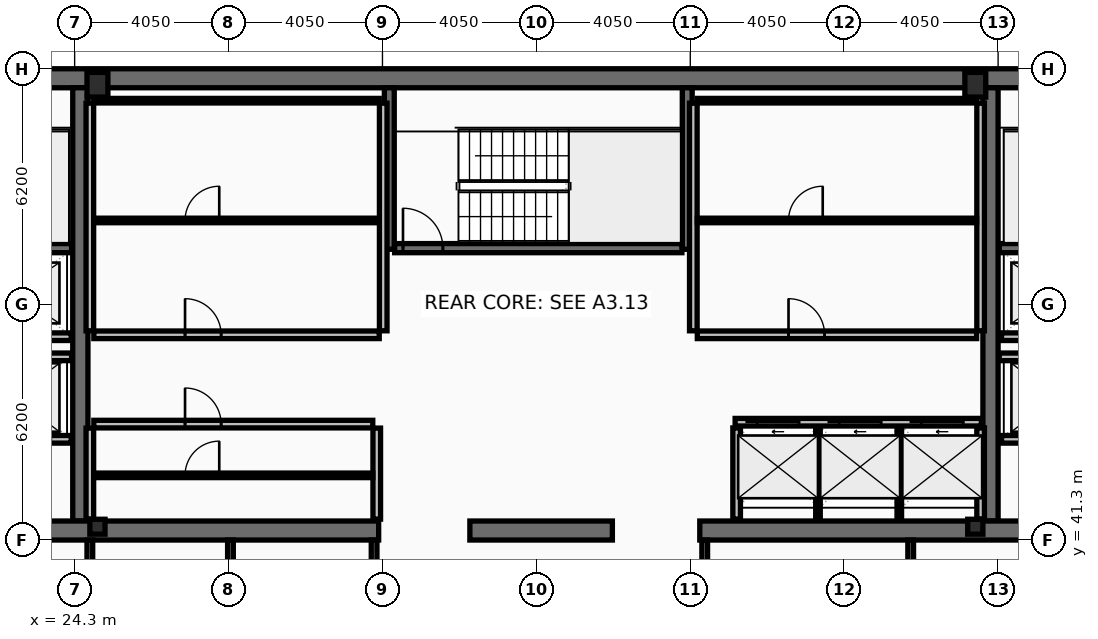
"""IFC4 building model, lengths in metres.
Left out: names, types, materials, properties, quantities, classifications, styles, units other than length and angle.
Written with IfcOpenShell. Run it as: python <this file> out.ifc"""

import sys

from ifc_helpers import new_model, si_unit, direction, frame, frame_2d, origin, origin_2d, place, context, subcontext, project, spatial, rectangle, hollow_rectangle, i_section, extrude, element, fill, save


model = new_model("IFC4")
c1 = context("Model", 3, precision=1e-05, world=origin(), true_north=direction((0.0, 1.0)))
c2 = subcontext(c1, "Body", "Model", "MODEL_VIEW")
j1 = project(units=[si_unit("LENGTHUNIT", "METRE"), si_unit("PLANEANGLEUNIT", "RADIAN")], contexts=[c1])
p1 = place(None, origin())
s1 = spatial("IfcSite", under=j1, at=p1, CompositionType="ELEMENT")
p2 = place(p1, origin())
s2 = spatial("IfcBuilding", under=s1, at=p2, CompositionType="ELEMENT")
p3 = place(p2, frame((0.0, 0.0, 318.2)))
s3 = spatial("IfcBuildingStorey", under=s2, at=p3, CompositionType="ELEMENT", Elevation=318.2)
p4 = place(p3, frame((16.2, 53.45, 0.0), z_axis=(0.0, 0.0, 1.0), x_axis=(1.0, 0.0, 0.0)))
e1 = element("IfcWall", 1, at=p4, inside=s3, PredefinedType="SHEAR", context=c2, shape_type="SweptSolid", body=[
    extrude(rectangle(XDim=40.5, YDim=0.5, at=frame_2d((20.25, 0.0))), origin(), (0.0, 0.0, 1.0), 3.44),
])
for number, where, z_axis, x_axis in (
    (2, (24.45, 41.8, 0.0), (0.0, 0.0, 1.0), (0.0, 1.0, 0.0)),
    (3, (48.4, 41.8, 0.0), (0.0, 0.0, 1.0), (0.0, 1.0, 0.0)),
):
    element("IfcWall", number, at=place(p3, frame(where, z_axis=z_axis, x_axis=x_axis)), inside=s3, PredefinedType="SHEAR", context=c2, shape_type="SweptSolid", body=[
        extrude(rectangle(XDim=11.4, YDim=0.4, at=frame_2d((5.7, 0.0))), origin(), (0.0, 0.0, 1.0), 3.44),
    ])
p5 = place(p3, frame((32.3, 41.55, 0.0), z_axis=(0.0, 0.0, 1.0), x_axis=(-1.0, 0.0, 0.0)))
e4 = element("IfcWall", 4, at=p5, inside=s3, PredefinedType="SHEAR", context=c2, shape_type="SweptSolid", body=[
    extrude(rectangle(XDim=11.45, YDim=0.5, at=frame_2d((5.725, 0.0))), origin(), (0.0, 0.0, 1.0), 3.44),
])
p6 = place(p3, frame((38.45, 41.55, 0.0), z_axis=(0.0, 0.0, 1.0), x_axis=(-1.0, 0.0, 0.0)))
e5 = element("IfcWall", 5, at=p6, inside=s3, PredefinedType="SHEAR", context=c2, shape_type="SweptSolid", body=[
    extrude(rectangle(XDim=3.75, YDim=0.5, at=frame_2d((1.875, 0.0))), origin(), (0.0, 0.0, 1.0), 3.44),
])
p7 = place(p3, frame((52.05, 41.55, 0.0), z_axis=(0.0, 0.0, 1.0), x_axis=(-1.0, 0.0, 0.0)))
e6 = element("IfcWall", 6, at=p7, inside=s3, PredefinedType="SHEAR", context=c2, shape_type="SweptSolid", body=[
    extrude(rectangle(XDim=11.3, YDim=0.5, at=frame_2d((5.65, 0.0))), origin(), (0.0, 0.0, 1.0), 3.44),
])
for number, where, z_axis, x_axis in (
    (7, (32.58, 48.95, 0.0), (0.0, 0.0, 1.0), (0.0, 1.0, 0.0)),
    (8, (40.42, 48.95, 0.0), (0.0, 0.0, 1.0), (0.0, 1.0, 0.0)),
):
    element("IfcWall", number, at=place(p3, frame(where, z_axis=z_axis, x_axis=x_axis)), inside=s3, PredefinedType="SHEAR", context=c2, shape_type="SweptSolid", body=[
        extrude(rectangle(XDim=4.25, YDim=0.26, at=frame_2d((2.125, 0.0))), origin(), (0.0, 0.0, 1.0), 3.44),
    ])
p8 = place(p3, frame((16.7, 48.98, 0.0), z_axis=(0.0, 0.0, 1.0), x_axis=(1.0, 0.0, 0.0)))
e9 = element("IfcWall", 9, at=p8, inside=s3, PredefinedType="SHEAR", context=c2, shape_type="SweptSolid", body=[
    extrude(rectangle(XDim=7.52, YDim=0.24, at=frame_2d((3.76, 0.0))), origin(), (0.0, 0.0, 1.0), 3.44),
])
p9 = place(p8, frame((0.22, 0.0, 0.0)))
e10 = element("IfcOpeningElement", 10, at=p9, cuts=e9, PredefinedType="OPENING", context=c2, shape_type="SweptSolid", body=[
    extrude(rectangle(XDim=1.05, YDim=2.15, at=frame_2d((0.525, 1.075))), frame((0.0, 0.13, 0.0), z_axis=(0.0, -1.0, 0.0), x_axis=(1.0, 0.0, 0.0)), (0.0, 0.0, 1.0), 0.26),
])
p10 = place(p3, frame((48.63, 48.98, 0.0), z_axis=(0.0, 0.0, 1.0), x_axis=(1.0, 0.0, 0.0)))
e11 = element("IfcWall", 11, at=p10, inside=s3, PredefinedType="SHEAR", context=c2, shape_type="SweptSolid", body=[
    extrude(rectangle(XDim=7.57, YDim=0.24, at=frame_2d((3.785, 0.0))), origin(), (0.0, 0.0, 1.0), 3.44),
])
p11 = place(p10, frame((6.3, 0.0, 0.0)))
e12 = element("IfcOpeningElement", 12, at=p11, cuts=e11, PredefinedType="OPENING", context=c2, shape_type="SweptSolid", body=[
    extrude(rectangle(XDim=1.05, YDim=2.15, at=frame_2d((0.525, 1.075))), frame((0.0, 0.13, 0.0), z_axis=(0.0, -1.0, 0.0), x_axis=(1.0, 0.0, 0.0)), (0.0, 0.0, 1.0), 0.26),
])
p12 = place(p3, frame((32.72, 48.98, 0.0), z_axis=(0.0, 0.0, 1.0), x_axis=(1.0, 0.0, 0.0)))
e13 = element("IfcWall", 13, at=p12, inside=s3, PredefinedType="SHEAR", context=c2, shape_type="SweptSolid", body=[
    extrude(rectangle(XDim=7.56, YDim=0.24, at=frame_2d((3.78, 0.0))), origin(), (0.0, 0.0, 1.0), 3.44),
])
p13 = place(p12, frame((0.22, 0.0, 0.0)))
e14 = element("IfcOpeningElement", 14, at=p13, cuts=e13, PredefinedType="OPENING", context=c2, shape_type="SweptSolid", body=[
    extrude(rectangle(XDim=1.05, YDim=2.15, at=frame_2d((0.525, 1.075))), frame((0.0, 0.13, 0.0), z_axis=(0.0, -1.0, 0.0), x_axis=(1.0, 0.0, 0.0)), (0.0, 0.0, 1.0), 0.26),
])
for number, where, z_axis, x_axis in (
    (15, (24.9, 53.28, 0.0), (0.0, 0.0, 1.0), (1.0, 0.0, 0.0)),
    (16, (48.0, 53.28, 0.0), (0.0, 0.0, 1.0), (1.0, 0.0, 0.0)),
):
    element("IfcColumn", number, at=place(p3, frame(where, z_axis=z_axis, x_axis=x_axis)), inside=s3, PredefinedType="COLUMN", context=c2, shape_type="SweptSolid", body=[
        extrude(hollow_rectangle(XDim=0.55, YDim=0.65, WallThickness=0.04, at=origin_2d()), origin(), (0.0, 0.0, 1.0), 3.6),
    ])
for number, where, z_axis, x_axis in (
    (17, (24.9, 41.65, 0.0), (0.0, 0.0, 1.0), (1.0, 0.0, 0.0)),
    (18, (48.0, 41.65, 0.0), (0.0, 0.0, 1.0), (1.0, 0.0, 0.0)),
):
    element("IfcColumn", number, at=place(p3, frame(where, z_axis=z_axis, x_axis=x_axis)), inside=s3, PredefinedType="COLUMN", context=c2, shape_type="SweptSolid", body=[
        extrude(i_section(OverallWidth=0.399, OverallDepth=0.393, WebThickness=0.023, FlangeThickness=0.037, at=origin_2d()), origin(), (0.0, 0.0, 1.0), 3.6),
    ])
p14 = place(p3, frame((41.68, 44.4, 0.0), z_axis=(0.0, 0.0, 1.0), x_axis=(1.0, 0.0, 0.0)))
e19 = element("IfcWall", 19, at=p14, inside=s3, PredefinedType="PARTITIONING", context=c2, shape_type="SweptSolid", body=[
    extrude(rectangle(XDim=6.48, YDim=0.2, at=frame_2d((3.24, 0.0))), origin(), (0.0, 0.0, 1.0), 3.44),
])
p15 = place(p14, frame((0.58, 0.0, 0.0)))
e20 = element("IfcOpeningElement", 20, at=p15, cuts=e19, PredefinedType="OPENING", context=c2, shape_type="SweptSolid", body=[
    extrude(rectangle(XDim=1.1, YDim=2.18, at=frame_2d((0.55, 1.09))), frame((0.0, 0.11, 0.0), z_axis=(0.0, -1.0, 0.0), x_axis=(1.0, 0.0, 0.0)), (0.0, 0.0, 1.0), 0.22),
])
p16 = place(p14, frame((2.74, 0.0, 0.0)))
e21 = element("IfcOpeningElement", 21, at=p16, cuts=e19, PredefinedType="OPENING", context=c2, shape_type="SweptSolid", body=[
    extrude(rectangle(XDim=1.1, YDim=2.18, at=frame_2d((0.55, 1.09))), frame((0.0, 0.11, 0.0), z_axis=(0.0, -1.0, 0.0), x_axis=(1.0, 0.0, 0.0)), (0.0, 0.0, 1.0), 0.22),
])
p17 = place(p14, frame((4.9, 0.0, 0.0)))
e22 = element("IfcOpeningElement", 22, at=p17, cuts=e19, PredefinedType="OPENING", context=c2, shape_type="SweptSolid", body=[
    extrude(rectangle(XDim=1.1, YDim=2.18, at=frame_2d((0.55, 1.09))), frame((0.0, 0.11, 0.0), z_axis=(0.0, -1.0, 0.0), x_axis=(1.0, 0.0, 0.0)), (0.0, 0.0, 1.0), 0.22),
])
p18 = place(p3, frame((51.61, 43.95, 0.0), z_axis=(0.0, 0.0, 1.0), x_axis=(-1.0, 0.0, 0.0)))
e23 = element("IfcWall", 23, at=p18, inside=s3, PredefinedType="PARTITIONING", context=c2, shape_type="SweptSolid", body=[
    extrude(rectangle(XDim=2.92, YDim=0.2, at=frame_2d((1.46, 0.0))), origin(), (0.0, 0.0, 1.0), 3.44),
])
p19 = place(p18, frame((0.81, 0.0, 0.0)))
e24 = element("IfcOpeningElement", 24, at=p19, cuts=e23, PredefinedType="OPENING", context=c2, shape_type="SweptSolid", body=[
    extrude(rectangle(XDim=1.3, YDim=2.18, at=frame_2d((0.65, 1.09))), frame((0.0, 0.11, 0.0), z_axis=(0.0, -1.0, 0.0), x_axis=(1.0, 0.0, 0.0)), (0.0, 0.0, 1.0), 0.22),
])
p20 = place(p3, frame((24.21, 43.95, 0.0), z_axis=(0.0, 0.0, 1.0), x_axis=(-1.0, 0.0, 0.0)))
e25 = element("IfcWall", 25, at=p20, inside=s3, PredefinedType="PARTITIONING", context=c2, shape_type="SweptSolid", body=[
    extrude(rectangle(XDim=2.97, YDim=0.2, at=frame_2d((1.485, 0.0))), origin(), (0.0, 0.0, 1.0), 3.44),
])
p21 = place(p20, frame((0.86, 0.0, 0.0)))
e26 = element("IfcOpeningElement", 26, at=p21, cuts=e25, PredefinedType="OPENING", context=c2, shape_type="SweptSolid", body=[
    extrude(rectangle(XDim=1.3, YDim=2.18, at=frame_2d((0.65, 1.09))), frame((0.0, 0.11, 0.0), z_axis=(0.0, -1.0, 0.0), x_axis=(1.0, 0.0, 0.0)), (0.0, 0.0, 1.0), 0.22),
])
p22 = place(p3, frame((51.61, 46.65, 0.0), z_axis=(0.0, 0.0, 1.0), x_axis=(-1.0, 0.0, 0.0)))
e27 = element("IfcWall", 27, at=p22, inside=s3, PredefinedType="PARTITIONING", context=c2, shape_type="SweptSolid", body=[
    extrude(rectangle(XDim=2.92, YDim=0.2, at=frame_2d((1.46, 0.0))), origin(), (0.0, 0.0, 1.0), 3.44),
])
p23 = place(p22, frame((0.86, 0.0, 0.0)))
e28 = element("IfcOpeningElement", 28, at=p23, cuts=e27, PredefinedType="OPENING", context=c2, shape_type="SweptSolid", body=[
    extrude(rectangle(XDim=1.2, YDim=2.18, at=frame_2d((0.6, 1.09))), frame((0.0, 0.11, 0.0), z_axis=(0.0, -1.0, 0.0), x_axis=(1.0, 0.0, 0.0)), (0.0, 0.0, 1.0), 0.22),
])
p24 = place(p3, frame((24.21, 46.65, 0.0), z_axis=(0.0, 0.0, 1.0), x_axis=(-1.0, 0.0, 0.0)))
e29 = element("IfcWall", 29, at=p24, inside=s3, PredefinedType="PARTITIONING", context=c2, shape_type="SweptSolid", body=[
    extrude(rectangle(XDim=2.97, YDim=0.2, at=frame_2d((1.485, 0.0))), origin(), (0.0, 0.0, 1.0), 3.44),
])
p25 = place(p24, frame((0.91, 0.0, 0.0)))
e30 = element("IfcOpeningElement", 30, at=p25, cuts=e29, PredefinedType="OPENING", context=c2, shape_type="SweptSolid", body=[
    extrude(rectangle(XDim=1.2, YDim=2.18, at=frame_2d((0.6, 1.09))), frame((0.0, 0.11, 0.0), z_axis=(0.0, -1.0, 0.0), x_axis=(1.0, 0.0, 0.0)), (0.0, 0.0, 1.0), 0.22),
])
p26 = place(p3, frame((21.2, 46.12, 0.0), z_axis=(0.0, 0.0, 1.0), x_axis=(1.0, 0.0, 0.0)))
e31 = element("IfcWall", 31, at=p26, inside=s3, PredefinedType="PARTITIONING", context=c2, shape_type="SweptSolid", body=[
    extrude(rectangle(XDim=3.02, YDim=0.2, at=frame_2d((1.51, 0.0))), origin(), (0.0, 0.0, 1.0), 3.44),
])
p27 = place(p3, frame((48.63, 46.12, 0.0), z_axis=(0.0, 0.0, 1.0), x_axis=(1.0, 0.0, 0.0)))
e32 = element("IfcWall", 32, at=p27, inside=s3, PredefinedType="PARTITIONING", context=c2, shape_type="SweptSolid", body=[
    extrude(rectangle(XDim=3.07, YDim=0.2, at=frame_2d((1.535, 0.0))), origin(), (0.0, 0.0, 1.0), 3.44),
])
for number, where, z_axis, x_axis in (
    (33, (24.7, 46.805, 0.0), (0.0, 0.0, 1.0), (0.0, 1.0, 0.0)),
    (34, (32.42, 46.805, 0.0), (0.0, 0.0, 1.0), (0.0, 1.0, 0.0)),
):
    element("IfcWall", number, at=place(p3, frame(where, z_axis=z_axis, x_axis=x_axis)), inside=s3, PredefinedType="PARTITIONING", context=c2, shape_type="SweptSolid", body=[
        extrude(rectangle(XDim=5.99, YDim=0.2, at=frame_2d((2.995, 0.0))), origin(), (0.0, 0.0, 1.0), 3.44),
    ])
p28 = place(p3, frame((24.805, 52.86, 0.0), z_axis=(0.0, 0.0, 1.0), x_axis=(1.0, 0.0, 0.0)))
e35 = element("IfcWall", 35, at=p28, inside=s3, PredefinedType="PARTITIONING", context=c2, shape_type="SweptSolid", body=[
    extrude(rectangle(XDim=7.51, YDim=0.12, at=frame_2d((3.755, 0.0))), origin(), (0.0, 0.0, 1.0), 3.44),
])
p29 = place(p3, frame((24.805, 49.709, 0.0), z_axis=(0.0, 0.0, 1.0), x_axis=(1.0, 0.0, 0.0)))
e36 = element("IfcWall", 36, at=p29, inside=s3, PredefinedType="PARTITIONING", context=c2, shape_type="SweptSolid", body=[
    extrude(rectangle(XDim=7.51, YDim=0.12, at=frame_2d((3.755, 0.0))), origin(), (0.0, 0.0, 1.0), 3.44),
])
p30 = place(p29, frame((2.4, 0.0, 0.0)))
e37 = element("IfcOpeningElement", 37, at=p30, cuts=e36, PredefinedType="OPENING", context=c2, shape_type="SweptSolid", body=[
    extrude(rectangle(XDim=0.9, YDim=2.05, at=frame_2d((0.45, 1.025))), frame((0.0, 0.07, 0.0), z_axis=(0.0, -1.0, 0.0), x_axis=(1.0, 0.0, 0.0)), (0.0, 0.0, 1.0), 0.14),
])
p31 = place(p3, frame((24.805, 46.7, 0.0), z_axis=(0.0, 0.0, 1.0), x_axis=(1.0, 0.0, 0.0)))
e38 = element("IfcWall", 38, at=p31, inside=s3, PredefinedType="PARTITIONING", context=c2, shape_type="SweptSolid", body=[
    extrude(rectangle(XDim=7.51, YDim=0.2, at=frame_2d((3.755, 0.0))), origin(), (0.0, 0.0, 1.0), 3.44),
])
p32 = place(p31, frame((2.4, 0.0, 0.0)))
e39 = element("IfcOpeningElement", 39, at=p32, cuts=e38, PredefinedType="OPENING", context=c2, shape_type="SweptSolid", body=[
    extrude(rectangle(XDim=0.95, YDim=2.1, at=frame_2d((0.475, 1.05))), frame((0.0, 0.11, 0.0), z_axis=(0.0, -1.0, 0.0), x_axis=(1.0, 0.0, 0.0)), (0.0, 0.0, 1.0), 0.22),
])
for number, where, z_axis, x_axis in (
    (40, (24.7, 41.85, 0.0), (0.0, 0.0, 1.0), (0.0, 1.0, 0.0)),
    (41, (32.25, 41.85, 0.0), (0.0, 0.0, 1.0), (0.0, 1.0, 0.0)),
):
    element("IfcWall", number, at=place(p3, frame(where, z_axis=z_axis, x_axis=x_axis)), inside=s3, PredefinedType="PARTITIONING", context=c2, shape_type="SweptSolid", body=[
        extrude(rectangle(XDim=2.395, YDim=0.2, at=frame_2d((1.198, 0.0))), origin(), (0.0, 0.0, 1.0), 3.44),
    ])
p33 = place(p3, frame((24.805, 43.002, 0.0), z_axis=(0.0, 0.0, 1.0), x_axis=(1.0, 0.0, 0.0)))
e42 = element("IfcWall", 42, at=p33, inside=s3, PredefinedType="PARTITIONING", context=c2, shape_type="SweptSolid", body=[
    extrude(rectangle(XDim=7.34, YDim=0.12, at=frame_2d((3.67, 0.0))), origin(), (0.0, 0.0, 1.0), 3.44),
])
p34 = place(p33, frame((2.4, 0.0, 0.0)))
e43 = element("IfcOpeningElement", 43, at=p34, cuts=e42, PredefinedType="OPENING", context=c2, shape_type="SweptSolid", body=[
    extrude(rectangle(XDim=0.9, YDim=2.05, at=frame_2d((0.45, 1.025))), frame((0.0, 0.07, 0.0), z_axis=(0.0, -1.0, 0.0), x_axis=(1.0, 0.0, 0.0)), (0.0, 0.0, 1.0), 0.14),
])
p35 = place(p3, frame((24.805, 44.35, 0.0), z_axis=(0.0, 0.0, 1.0), x_axis=(1.0, 0.0, 0.0)))
e44 = element("IfcWall", 44, at=p35, inside=s3, PredefinedType="PARTITIONING", context=c2, shape_type="SweptSolid", body=[
    extrude(rectangle(XDim=7.34, YDim=0.2, at=frame_2d((3.67, 0.0))), origin(), (0.0, 0.0, 1.0), 3.44),
])
p36 = place(p35, frame((2.4, 0.0, 0.0)))
e45 = element("IfcOpeningElement", 45, at=p36, cuts=e44, PredefinedType="OPENING", context=c2, shape_type="SweptSolid", body=[
    extrude(rectangle(XDim=0.95, YDim=2.1, at=frame_2d((0.475, 1.05))), frame((0.0, 0.11, 0.0), z_axis=(0.0, -1.0, 0.0), x_axis=(1.0, 0.0, 0.0)), (0.0, 0.0, 1.0), 0.22),
])
for number, where, z_axis, x_axis in (
    (46, (40.58, 46.805, 0.0), (0.0, 0.0, 1.0), (0.0, 1.0, 0.0)),
    (47, (48.14, 46.805, 0.0), (0.0, 0.0, 1.0), (0.0, 1.0, 0.0)),
):
    element("IfcWall", number, at=place(p3, frame(where, z_axis=z_axis, x_axis=x_axis)), inside=s3, PredefinedType="PARTITIONING", context=c2, shape_type="SweptSolid", body=[
        extrude(rectangle(XDim=5.99, YDim=0.2, at=frame_2d((2.995, 0.0))), origin(), (0.0, 0.0, 1.0), 3.44),
    ])
p37 = place(p3, frame((40.685, 52.86, 0.0), z_axis=(0.0, 0.0, 1.0), x_axis=(1.0, 0.0, 0.0)))
e48 = element("IfcWall", 48, at=p37, inside=s3, PredefinedType="PARTITIONING", context=c2, shape_type="SweptSolid", body=[
    extrude(rectangle(XDim=7.35, YDim=0.12, at=frame_2d((3.675, 0.0))), origin(), (0.0, 0.0, 1.0), 3.44),
])
p38 = place(p3, frame((40.685, 49.709, 0.0), z_axis=(0.0, 0.0, 1.0), x_axis=(1.0, 0.0, 0.0)))
e49 = element("IfcWall", 49, at=p38, inside=s3, PredefinedType="PARTITIONING", context=c2, shape_type="SweptSolid", body=[
    extrude(rectangle(XDim=7.35, YDim=0.12, at=frame_2d((3.675, 0.0))), origin(), (0.0, 0.0, 1.0), 3.44),
])
p39 = place(p38, frame((2.4, 0.0, 0.0)))
e50 = element("IfcOpeningElement", 50, at=p39, cuts=e49, PredefinedType="OPENING", context=c2, shape_type="SweptSolid", body=[
    extrude(rectangle(XDim=0.9, YDim=2.05, at=frame_2d((0.45, 1.025))), frame((0.0, 0.07, 0.0), z_axis=(0.0, -1.0, 0.0), x_axis=(1.0, 0.0, 0.0)), (0.0, 0.0, 1.0), 0.14),
])
p40 = place(p3, frame((40.685, 46.7, 0.0), z_axis=(0.0, 0.0, 1.0), x_axis=(1.0, 0.0, 0.0)))
e51 = element("IfcWall", 51, at=p40, inside=s3, PredefinedType="PARTITIONING", context=c2, shape_type="SweptSolid", body=[
    extrude(rectangle(XDim=7.35, YDim=0.2, at=frame_2d((3.675, 0.0))), origin(), (0.0, 0.0, 1.0), 3.44),
])
p41 = place(p40, frame((2.4, 0.0, 0.0)))
e52 = element("IfcOpeningElement", 52, at=p41, cuts=e51, PredefinedType="OPENING", context=c2, shape_type="SweptSolid", body=[
    extrude(rectangle(XDim=0.95, YDim=2.1, at=frame_2d((0.475, 1.05))), frame((0.0, 0.11, 0.0), z_axis=(0.0, -1.0, 0.0), x_axis=(1.0, 0.0, 0.0)), (0.0, 0.0, 1.0), 0.22),
])
for number, where, z_axis, x_axis in (
    (53, (41.72, 41.85, 0.0), (0.0, 0.0, 1.0), (0.0, 1.0, 0.0)),
    (54, (48.14, 41.85, 0.0), (0.0, 0.0, 1.0), (0.0, 1.0, 0.0)),
):
    element("IfcWall", number, at=place(p3, frame(where, z_axis=z_axis, x_axis=x_axis)), inside=s3, PredefinedType="PARTITIONING", context=c2, shape_type="SweptSolid", body=[
        extrude(rectangle(XDim=2.4, YDim=0.2, at=frame_2d((1.2, 0.0))), origin(), (0.0, 0.0, 1.0), 3.44),
    ])
for number, where, z_axis, x_axis in (
    (55, (43.86, 41.85, 0.0), (0.0, 0.0, 1.0), (0.0, 1.0, 0.0)),
    (56, (46.0, 41.85, 0.0), (0.0, 0.0, 1.0), (0.0, 1.0, 0.0)),
):
    element("IfcWall", number, at=place(p3, frame(where, z_axis=z_axis, x_axis=x_axis)), inside=s3, PredefinedType="PARTITIONING", context=c2, shape_type="SweptSolid", body=[
        extrude(rectangle(XDim=2.4, YDim=0.12, at=frame_2d((1.2, 0.0))), origin(), (0.0, 0.0, 1.0), 3.44),
    ])
p42 = place(p3, frame((24.7, 38.28, 0.0), z_axis=(0.0, 0.0, 1.0), x_axis=(0.0, 1.0, 0.0)))
e57 = element("IfcWall", 57, at=p42, inside=s3, PredefinedType="PARTITIONING", context=c2, shape_type="SweptSolid", body=[
    extrude(rectangle(XDim=3.02, YDim=0.15, at=frame_2d((1.51, 0.0))), origin(), (0.0, 0.0, 1.0), 2.83),
])
for number, where, z_axis, x_axis in (
    (58, (28.4, 38.28, 0.0), (0.0, 0.0, 1.0), (0.0, 1.0, 0.0)),
    (59, (32.18, 38.28, 0.0), (0.0, 0.0, 1.0), (0.0, 1.0, 0.0)),
    (60, (40.88, 38.28, 0.0), (0.0, 0.0, 1.0), (0.0, 1.0, 0.0)),
    (61, (46.3, 38.28, 0.0), (0.0, 0.0, 1.0), (0.0, 1.0, 0.0)),
):
    element("IfcWall", number, at=place(p3, frame(where, z_axis=z_axis, x_axis=x_axis)), inside=s3, PredefinedType="PARTITIONING", context=c2, shape_type="SweptSolid", body=[
        extrude(rectangle(XDim=3.02, YDim=0.15, at=frame_2d((1.51, 0.0))), origin(), (0.0, 0.0, 1.0), 3.44),
    ])
p43 = place(p13, origin())
e62 = element("IfcDoor", 62, at=p43, inside=s3, OperationType="SINGLE_SWING_LEFT", PredefinedType="DOOR", context=c2, shape_type="SweptSolid", body=[
    extrude(rectangle(XDim=1.05, YDim=2.15, at=frame_2d((0.525, 1.075))), frame((0.0, 0.025, 0.0), z_axis=(0.0, -1.0, 0.0), x_axis=(1.0, 0.0, 0.0)), (0.0, 0.0, 1.0), 0.05),
])
fill(e14, e62)
p44 = place(p15, origin())
e63 = element("IfcDoor", 63, at=p44, inside=s3, OperationType="SLIDING_TO_LEFT", PredefinedType="DOOR", context=c2, shape_type="SweptSolid", body=[
    extrude(rectangle(XDim=1.1, YDim=2.18, at=frame_2d((0.55, 1.09))), frame((0.0, 0.025, 0.0), z_axis=(0.0, -1.0, 0.0), x_axis=(1.0, 0.0, 0.0)), (0.0, 0.0, 1.0), 0.05),
])
fill(e20, e63)
p45 = place(p16, origin())
e64 = element("IfcDoor", 64, at=p45, inside=s3, OperationType="SLIDING_TO_LEFT", PredefinedType="DOOR", context=c2, shape_type="SweptSolid", body=[
    extrude(rectangle(XDim=1.1, YDim=2.18, at=frame_2d((0.55, 1.09))), frame((0.0, 0.025, 0.0), z_axis=(0.0, -1.0, 0.0), x_axis=(1.0, 0.0, 0.0)), (0.0, 0.0, 1.0), 0.05),
])
fill(e21, e64)
p46 = place(p17, origin())
e65 = element("IfcDoor", 65, at=p46, inside=s3, OperationType="SLIDING_TO_LEFT", PredefinedType="DOOR", context=c2, shape_type="SweptSolid", body=[
    extrude(rectangle(XDim=1.1, YDim=2.18, at=frame_2d((0.55, 1.09))), frame((0.0, 0.025, 0.0), z_axis=(0.0, -1.0, 0.0), x_axis=(1.0, 0.0, 0.0)), (0.0, 0.0, 1.0), 0.05),
])
fill(e22, e65)
p47 = place(p30, origin())
e66 = element("IfcDoor", 66, at=p47, inside=s3, OperationType="SINGLE_SWING_RIGHT", PredefinedType="DOOR", context=c2, shape_type="SweptSolid", body=[
    extrude(rectangle(XDim=0.9, YDim=2.05, at=frame_2d((0.45, 1.025))), frame((0.0, 0.025, 0.0), z_axis=(0.0, -1.0, 0.0), x_axis=(1.0, 0.0, 0.0)), (0.0, 0.0, 1.0), 0.05),
])
fill(e37, e66)
p48 = place(p32, origin())
e67 = element("IfcDoor", 67, at=p48, inside=s3, OperationType="SINGLE_SWING_LEFT", PredefinedType="DOOR", context=c2, shape_type="SweptSolid", body=[
    extrude(rectangle(XDim=0.95, YDim=2.1, at=frame_2d((0.475, 1.05))), frame((0.0, 0.025, 0.0), z_axis=(0.0, -1.0, 0.0), x_axis=(1.0, 0.0, 0.0)), (0.0, 0.0, 1.0), 0.05),
])
fill(e39, e67)
p49 = place(p34, origin())
e68 = element("IfcDoor", 68, at=p49, inside=s3, OperationType="SINGLE_SWING_RIGHT", PredefinedType="DOOR", context=c2, shape_type="SweptSolid", body=[
    extrude(rectangle(XDim=0.9, YDim=2.05, at=frame_2d((0.45, 1.025))), frame((0.0, 0.025, 0.0), z_axis=(0.0, -1.0, 0.0), x_axis=(1.0, 0.0, 0.0)), (0.0, 0.0, 1.0), 0.05),
])
fill(e43, e68)
p50 = place(p36, origin())
e69 = element("IfcDoor", 69, at=p50, inside=s3, OperationType="SINGLE_SWING_LEFT", PredefinedType="DOOR", context=c2, shape_type="SweptSolid", body=[
    extrude(rectangle(XDim=0.95, YDim=2.1, at=frame_2d((0.475, 1.05))), frame((0.0, 0.025, 0.0), z_axis=(0.0, -1.0, 0.0), x_axis=(1.0, 0.0, 0.0)), (0.0, 0.0, 1.0), 0.05),
])
fill(e45, e69)
p51 = place(p39, origin())
e70 = element("IfcDoor", 70, at=p51, inside=s3, OperationType="SINGLE_SWING_RIGHT", PredefinedType="DOOR", context=c2, shape_type="SweptSolid", body=[
    extrude(rectangle(XDim=0.9, YDim=2.05, at=frame_2d((0.45, 1.025))), frame((0.0, 0.025, 0.0), z_axis=(0.0, -1.0, 0.0), x_axis=(1.0, 0.0, 0.0)), (0.0, 0.0, 1.0), 0.05),
])
fill(e50, e70)
p52 = place(p41, origin())
e71 = element("IfcDoor", 71, at=p52, inside=s3, OperationType="SINGLE_SWING_LEFT", PredefinedType="DOOR", context=c2, shape_type="SweptSolid", body=[
    extrude(rectangle(XDim=0.95, YDim=2.1, at=frame_2d((0.475, 1.05))), frame((0.0, 0.025, 0.0), z_axis=(0.0, -1.0, 0.0), x_axis=(1.0, 0.0, 0.0)), (0.0, 0.0, 1.0), 0.05),
])
fill(e52, e71)
save(model, sys.argv[1])
